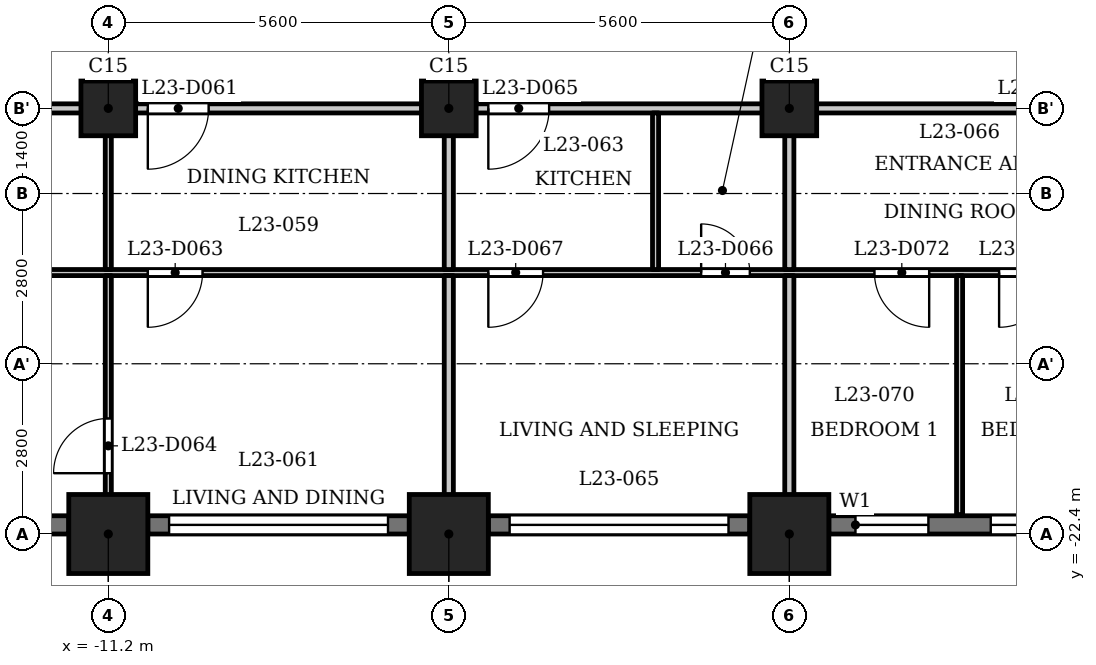
"""IFC4 building model, lengths in metres.
Left out: names, types, materials, properties, quantities, classifications, styles, units other than length and angle.
Written with IfcOpenShell. Run it as: python <this file> out.ifc"""

import sys

from ifc_helpers import new_model, si_unit, direction, frame, frame_2d, origin, origin_2d, place, context, subcontext, project, spatial, rectangle, extrude, element, fill, save


model = new_model("IFC4")
c1 = context("Model", 3, precision=1e-05, world=origin(), true_north=direction((0.0, 1.0)))
c2 = subcontext(c1, "Body", "Model", "MODEL_VIEW")
j1 = project(units=[si_unit("LENGTHUNIT", "METRE"), si_unit("PLANEANGLEUNIT", "RADIAN")], contexts=[c1])
p1 = place(None, origin())
s1 = spatial("IfcSite", under=j1, at=p1, CompositionType="ELEMENT")
p2 = place(p1, origin())
s2 = spatial("IfcBuilding", under=s1, at=p2, CompositionType="ELEMENT")
p3 = place(p2, frame((0.0, 0.0, 93.8)))
s3 = spatial("IfcBuildingStorey", under=s2, at=p3, CompositionType="ELEMENT", Elevation=93.8)
for number, where, z_axis, x_axis in (
    (1, (-11.2, -22.4, 0.0), (0.0, 0.0, 1.0), (1.0, 0.0, 0.0)),
    (2, (-5.6, -22.4, 0.0), (0.0, 0.0, 1.0), (1.0, 0.0, 0.0)),
    (3, (0.0, -22.4, 0.0), (0.0, 0.0, 1.0), (1.0, 0.0, 0.0)),
):
    element("IfcColumn", number, at=place(p3, frame(where, z_axis=z_axis, x_axis=x_axis)), inside=s3, PredefinedType="COLUMN", context=c2, shape_type="SweptSolid", body=[
        extrude(rectangle(XDim=1.3, YDim=1.3, at=origin_2d()), origin(), (0.0, 0.0, 1.0), 3.5),
    ])
for number, where, z_axis, x_axis in (
    (4, (-11.2, -15.4, 0.0), (0.0, 0.0, 1.0), (1.0, 0.0, 0.0)),
    (5, (-5.6, -15.4, 0.0), (0.0, 0.0, 1.0), (1.0, 0.0, 0.0)),
    (6, (0.0, -15.4, 0.0), (0.0, 0.0, 1.0), (1.0, 0.0, 0.0)),
):
    element("IfcColumn", number, at=place(p3, frame(where, z_axis=z_axis, x_axis=x_axis)), inside=s3, PredefinedType="COLUMN", context=c2, shape_type="SweptSolid", body=[
        extrude(rectangle(XDim=0.9, YDim=0.9, at=origin_2d()), origin(), (0.0, 0.0, 1.0), 3.5),
    ])
p4 = place(p3, frame((-16.15, -22.25, 0.0), z_axis=(0.0, 0.0, 1.0), x_axis=(1.0, 0.0, 0.0)))
e7 = element("IfcWall", 7, at=p4, inside=s3, PredefinedType="SOLIDWALL", context=c2, shape_type="SweptSolid", body=[
    extrude(rectangle(XDim=4.3, YDim=0.3, at=frame_2d((2.15, 0.0))), origin(), (0.0, 0.0, 1.0), 2.4),
])
p5 = place(p4, frame((0.35, 0.0, 1.2)))
e8 = element("IfcOpeningElement", 8, at=p5, cuts=e7, PredefinedType="OPENING", context=c2, shape_type="SweptSolid", body=[
    extrude(rectangle(XDim=3.6, YDim=0.95, at=frame_2d((1.8, 0.475))), frame((0.0, 0.16, 0.0), z_axis=(0.0, -1.0, 0.0), x_axis=(1.0, 0.0, 0.0)), (0.0, 0.0, 1.0), 0.32),
])
p6 = place(p3, frame((-10.55, -22.25, 0.0), z_axis=(0.0, 0.0, 1.0), x_axis=(1.0, 0.0, 0.0)))
e9 = element("IfcWall", 9, at=p6, inside=s3, PredefinedType="SOLIDWALL", context=c2, shape_type="SweptSolid", body=[
    extrude(rectangle(XDim=4.3, YDim=0.3, at=frame_2d((2.15, 0.0))), origin(), (0.0, 0.0, 1.0), 2.4),
])
p7 = place(p6, frame((0.35, 0.0, 1.2)))
e10 = element("IfcOpeningElement", 10, at=p7, cuts=e9, PredefinedType="OPENING", context=c2, shape_type="SweptSolid", body=[
    extrude(rectangle(XDim=3.6, YDim=0.95, at=frame_2d((1.8, 0.475))), frame((0.0, 0.16, 0.0), z_axis=(0.0, -1.0, 0.0), x_axis=(1.0, 0.0, 0.0)), (0.0, 0.0, 1.0), 0.32),
])
p8 = place(p3, frame((-4.95, -22.25, 0.0), z_axis=(0.0, 0.0, 1.0), x_axis=(1.0, 0.0, 0.0)))
e11 = element("IfcWall", 11, at=p8, inside=s3, PredefinedType="SOLIDWALL", context=c2, shape_type="SweptSolid", body=[
    extrude(rectangle(XDim=4.3, YDim=0.3, at=frame_2d((2.15, 0.0))), origin(), (0.0, 0.0, 1.0), 2.4),
])
p9 = place(p8, frame((0.35, 0.0, 1.2)))
e12 = element("IfcOpeningElement", 12, at=p9, cuts=e11, PredefinedType="OPENING", context=c2, shape_type="SweptSolid", body=[
    extrude(rectangle(XDim=3.6, YDim=0.95, at=frame_2d((1.8, 0.475))), frame((0.0, 0.16, 0.0), z_axis=(0.0, -1.0, 0.0), x_axis=(1.0, 0.0, 0.0)), (0.0, 0.0, 1.0), 0.32),
])
p10 = place(p3, frame((0.65, -22.25, 0.0), z_axis=(0.0, 0.0, 1.0), x_axis=(1.0, 0.0, 0.0)))
e13 = element("IfcWall", 13, at=p10, inside=s3, PredefinedType="SOLIDWALL", context=c2, shape_type="SweptSolid", body=[
    extrude(rectangle(XDim=4.3, YDim=0.3, at=frame_2d((2.15, 0.0))), origin(), (0.0, 0.0, 1.0), 2.4),
])
p11 = place(p10, frame((0.438, 0.0, 0.6)))
e14 = element("IfcOpeningElement", 14, at=p11, cuts=e13, PredefinedType="OPENING", context=c2, shape_type="SweptSolid", body=[
    extrude(rectangle(XDim=1.2, YDim=1.55, at=frame_2d((0.6, 0.775))), frame((0.0, 0.16, 0.0), z_axis=(0.0, -1.0, 0.0), x_axis=(1.0, 0.0, 0.0)), (0.0, 0.0, 1.0), 0.32),
])
p12 = place(p10, frame((2.663, 0.0, 0.6)))
e15 = element("IfcOpeningElement", 15, at=p12, cuts=e13, PredefinedType="OPENING", context=c2, shape_type="SweptSolid", body=[
    extrude(rectangle(XDim=1.2, YDim=1.55, at=frame_2d((0.6, 0.775))), frame((0.0, 0.16, 0.0), z_axis=(0.0, -1.0, 0.0), x_axis=(1.0, 0.0, 0.0)), (0.0, 0.0, 1.0), 0.32),
])
p13 = place(p3, frame((-26.19, -18.1, 0.0), z_axis=(0.0, 0.0, 1.0), x_axis=(1.0, 0.0, 0.0)))
e16 = element("IfcWall", 16, at=p13, inside=s3, PredefinedType="PARTITIONING", context=c2, shape_type="SweptSolid", body=[
    extrude(rectangle(XDim=52.63, YDim=0.1, at=frame_2d((26.315, 0.0))), origin(), (0.0, 0.0, 1.0), 3.2),
])
p14 = place(p13, frame((1.09, 0.0, 0.0)))
e17 = element("IfcOpeningElement", 17, at=p14, cuts=e16, PredefinedType="OPENING", context=c2, shape_type="SweptSolid", body=[
    extrude(rectangle(XDim=0.8, YDim=2.1, at=frame_2d((0.4, 1.05))), frame((0.0, 0.06, 0.0), z_axis=(0.0, -1.0, 0.0), x_axis=(1.0, 0.0, 0.0)), (0.0, 0.0, 1.0), 0.12),
])
p15 = place(p13, frame((4.44, 0.0, 0.0)))
e18 = element("IfcOpeningElement", 18, at=p15, cuts=e16, PredefinedType="OPENING", context=c2, shape_type="SweptSolid", body=[
    extrude(rectangle(XDim=0.9, YDim=2.1, at=frame_2d((0.45, 1.05))), frame((0.0, 0.06, 0.0), z_axis=(0.0, -1.0, 0.0), x_axis=(1.0, 0.0, 0.0)), (0.0, 0.0, 1.0), 0.12),
])
p16 = place(p13, frame((10.04, 0.0, 0.0)))
e19 = element("IfcOpeningElement", 19, at=p16, cuts=e16, PredefinedType="OPENING", context=c2, shape_type="SweptSolid", body=[
    extrude(rectangle(XDim=0.8, YDim=2.1, at=frame_2d((0.4, 1.05))), frame((0.0, 0.06, 0.0), z_axis=(0.0, -1.0, 0.0), x_axis=(1.0, 0.0, 0.0)), (0.0, 0.0, 1.0), 0.12),
])
p17 = place(p13, frame((15.64, 0.0, 0.0)))
e20 = element("IfcOpeningElement", 20, at=p17, cuts=e16, PredefinedType="OPENING", context=c2, shape_type="SweptSolid", body=[
    extrude(rectangle(XDim=0.9, YDim=2.1, at=frame_2d((0.45, 1.05))), frame((0.0, 0.06, 0.0), z_axis=(0.0, -1.0, 0.0), x_axis=(1.0, 0.0, 0.0)), (0.0, 0.0, 1.0), 0.12),
])
p18 = place(p13, frame((24.74, 0.0, 0.0)))
e21 = element("IfcOpeningElement", 21, at=p18, cuts=e16, PredefinedType="OPENING", context=c2, shape_type="SweptSolid", body=[
    extrude(rectangle(XDim=0.8, YDim=2.1, at=frame_2d((0.4, 1.05))), frame((0.0, 0.06, 0.0), z_axis=(0.0, -1.0, 0.0), x_axis=(1.0, 0.0, 0.0)), (0.0, 0.0, 1.0), 0.12),
])
p19 = place(p13, frame((21.24, 0.0, 0.0)))
e22 = element("IfcOpeningElement", 22, at=p19, cuts=e16, PredefinedType="OPENING", context=c2, shape_type="SweptSolid", body=[
    extrude(rectangle(XDim=0.9, YDim=2.1, at=frame_2d((0.45, 1.05))), frame((0.0, 0.06, 0.0), z_axis=(0.0, -1.0, 0.0), x_axis=(1.0, 0.0, 0.0)), (0.0, 0.0, 1.0), 0.12),
])
p20 = place(p13, frame((35.94, 0.0, 0.0)))
e23 = element("IfcOpeningElement", 23, at=p20, cuts=e16, PredefinedType="OPENING", context=c2, shape_type="SweptSolid", body=[
    extrude(rectangle(XDim=0.8, YDim=2.1, at=frame_2d((0.4, 1.05))), frame((0.0, 0.06, 0.0), z_axis=(0.0, -1.0, 0.0), x_axis=(1.0, 0.0, 0.0)), (0.0, 0.0, 1.0), 0.12),
])
p21 = place(p13, frame((33.19, 0.0, 0.0)))
e24 = element("IfcOpeningElement", 24, at=p21, cuts=e16, PredefinedType="OPENING", context=c2, shape_type="SweptSolid", body=[
    extrude(rectangle(XDim=0.9, YDim=2.1, at=frame_2d((0.45, 1.05))), frame((0.0, 0.06, 0.0), z_axis=(0.0, -1.0, 0.0), x_axis=(1.0, 0.0, 0.0)), (0.0, 0.0, 1.0), 0.12),
])
p22 = place(p13, frame((27.59, 0.0, 0.0)))
e25 = element("IfcOpeningElement", 25, at=p22, cuts=e16, PredefinedType="OPENING", context=c2, shape_type="SweptSolid", body=[
    extrude(rectangle(XDim=0.9, YDim=2.1, at=frame_2d((0.45, 1.05))), frame((0.0, 0.06, 0.0), z_axis=(0.0, -1.0, 0.0), x_axis=(1.0, 0.0, 0.0)), (0.0, 0.0, 1.0), 0.12),
])
p23 = place(p13, frame((29.64, 0.0, 0.0)))
e26 = element("IfcOpeningElement", 26, at=p23, cuts=e16, PredefinedType="OPENING", context=c2, shape_type="SweptSolid", body=[
    extrude(rectangle(XDim=0.9, YDim=2.1, at=frame_2d((0.45, 1.05))), frame((0.0, 0.06, 0.0), z_axis=(0.0, -1.0, 0.0), x_axis=(1.0, 0.0, 0.0)), (0.0, 0.0, 1.0), 0.12),
])
p24 = place(p13, frame((41.54, 0.0, 0.0)))
e27 = element("IfcOpeningElement", 27, at=p24, cuts=e16, PredefinedType="OPENING", context=c2, shape_type="SweptSolid", body=[
    extrude(rectangle(XDim=0.8, YDim=2.1, at=frame_2d((0.4, 1.05))), frame((0.0, 0.06, 0.0), z_axis=(0.0, -1.0, 0.0), x_axis=(1.0, 0.0, 0.0)), (0.0, 0.0, 1.0), 0.12),
])
p25 = place(p13, frame((38.54, 0.0, 0.0)))
e28 = element("IfcOpeningElement", 28, at=p25, cuts=e16, PredefinedType="OPENING", context=c2, shape_type="SweptSolid", body=[
    extrude(rectangle(XDim=0.9, YDim=2.1, at=frame_2d((0.45, 1.05))), frame((0.0, 0.06, 0.0), z_axis=(0.0, -1.0, 0.0), x_axis=(1.0, 0.0, 0.0)), (0.0, 0.0, 1.0), 0.12),
])
p26 = place(p13, frame((49.204, 0.0, 0.0)))
e29 = element("IfcOpeningElement", 29, at=p26, cuts=e16, PredefinedType="OPENING", context=c2, shape_type="SweptSolid", body=[
    extrude(rectangle(XDim=0.8, YDim=2.1, at=frame_2d((0.4, 1.05))), frame((0.0, 0.06, 0.0), z_axis=(0.0, -1.0, 0.0), x_axis=(1.0, 0.0, 0.0)), (0.0, 0.0, 1.0), 0.12),
])
p27 = place(p13, frame((43.64, 0.0, 0.0)))
e30 = element("IfcOpeningElement", 30, at=p27, cuts=e16, PredefinedType="OPENING", context=c2, shape_type="SweptSolid", body=[
    extrude(rectangle(XDim=0.9, YDim=2.1, at=frame_2d((0.45, 1.05))), frame((0.0, 0.06, 0.0), z_axis=(0.0, -1.0, 0.0), x_axis=(1.0, 0.0, 0.0)), (0.0, 0.0, 1.0), 0.12),
])
p28 = place(p3, frame((-27.484, -15.4, 0.0), z_axis=(0.0, 0.0, 1.0), x_axis=(1.0, 0.0, 0.0)))
e31 = element("IfcWall", 31, at=p28, inside=s3, PredefinedType="PARTITIONING", context=c2, shape_type="SweptSolid", body=[
    extrude(rectangle(XDim=54.968, YDim=0.15, at=frame_2d((27.484, 0.0))), origin(), (0.0, 0.0, 1.0), 3.2),
])
p29 = place(p28, frame((5.734, 0.0, 0.0)))
e32 = element("IfcOpeningElement", 32, at=p29, cuts=e31, PredefinedType="OPENING", context=c2, shape_type="SweptSolid", body=[
    extrude(rectangle(XDim=1.0, YDim=2.1, at=frame_2d((0.5, 1.05))), frame((0.0, 0.085, 0.0), z_axis=(0.0, -1.0, 0.0), x_axis=(1.0, 0.0, 0.0)), (0.0, 0.0, 1.0), 0.17),
])
p30 = place(p28, frame((16.934, 0.0, 0.0)))
e33 = element("IfcOpeningElement", 33, at=p30, cuts=e31, PredefinedType="OPENING", context=c2, shape_type="SweptSolid", body=[
    extrude(rectangle(XDim=1.0, YDim=2.1, at=frame_2d((0.5, 1.05))), frame((0.0, 0.085, 0.0), z_axis=(0.0, -1.0, 0.0), x_axis=(1.0, 0.0, 0.0)), (0.0, 0.0, 1.0), 0.17),
])
p31 = place(p28, frame((22.534, 0.0, 0.0)))
e34 = element("IfcOpeningElement", 34, at=p31, cuts=e31, PredefinedType="OPENING", context=c2, shape_type="SweptSolid", body=[
    extrude(rectangle(XDim=1.0, YDim=2.1, at=frame_2d((0.5, 1.05))), frame((0.0, 0.085, 0.0), z_axis=(0.0, -1.0, 0.0), x_axis=(1.0, 0.0, 0.0)), (0.0, 0.0, 1.0), 0.17),
])
p32 = place(p28, frame((31.384, 0.0, 0.0)))
e35 = element("IfcOpeningElement", 35, at=p32, cuts=e31, PredefinedType="OPENING", context=c2, shape_type="SweptSolid", body=[
    extrude(rectangle(XDim=1.0, YDim=2.1, at=frame_2d((0.5, 1.05))), frame((0.0, 0.085, 0.0), z_axis=(0.0, -1.0, 0.0), x_axis=(1.0, 0.0, 0.0)), (0.0, 0.0, 1.0), 0.17),
])
p33 = place(p28, frame((39.584, 0.0, 0.0)))
e36 = element("IfcOpeningElement", 36, at=p33, cuts=e31, PredefinedType="OPENING", context=c2, shape_type="SweptSolid", body=[
    extrude(rectangle(XDim=1.0, YDim=2.1, at=frame_2d((0.5, 1.05))), frame((0.0, 0.085, 0.0), z_axis=(0.0, -1.0, 0.0), x_axis=(1.0, 0.0, 0.0)), (0.0, 0.0, 1.0), 0.17),
])
p34 = place(p28, frame((44.934, 0.0, 0.0)))
e37 = element("IfcOpeningElement", 37, at=p34, cuts=e31, PredefinedType="OPENING", context=c2, shape_type="SweptSolid", body=[
    extrude(rectangle(XDim=1.0, YDim=2.1, at=frame_2d((0.5, 1.05))), frame((0.0, 0.085, 0.0), z_axis=(0.0, -1.0, 0.0), x_axis=(1.0, 0.0, 0.0)), (0.0, 0.0, 1.0), 0.17),
])
p35 = place(p3, frame((-11.2, -23.03, 0.0), z_axis=(0.0, 0.0, 1.0), x_axis=(0.0, 1.0, 0.0)))
e38 = element("IfcWall", 38, at=p35, inside=s3, PredefinedType="PARTITIONING", context=c2, shape_type="SweptSolid", body=[
    extrude(rectangle(XDim=4.88, YDim=0.1, at=frame_2d((2.44, 0.0))), origin(), (0.0, 0.0, 1.0), 3.2),
])
p36 = place(p35, frame((1.63, 0.0, 0.0)))
e39 = element("IfcOpeningElement", 39, at=p36, cuts=e38, PredefinedType="OPENING", context=c2, shape_type="SweptSolid", body=[
    extrude(rectangle(XDim=0.9, YDim=2.1, at=frame_2d((0.45, 1.05))), frame((0.0, 0.06, 0.0), z_axis=(0.0, -1.0, 0.0), x_axis=(1.0, 0.0, 0.0)), (0.0, 0.0, 1.0), 0.12),
])
p37 = place(p3, frame((-11.2, -18.05, 0.0), z_axis=(0.0, 0.0, 1.0), x_axis=(0.0, 1.0, 0.0)))
e40 = element("IfcWall", 40, at=p37, inside=s3, PredefinedType="PARTITIONING", context=c2, shape_type="SweptSolid", body=[
    extrude(rectangle(XDim=2.575, YDim=0.1, at=frame_2d((1.288, 0.0))), origin(), (0.0, 0.0, 1.0), 3.2),
])
p38 = place(p3, frame((-5.6, -23.03, 0.0), z_axis=(0.0, 0.0, 1.0), x_axis=(0.0, 1.0, 0.0)))
e41 = element("IfcWall", 41, at=p38, inside=s3, PredefinedType="PARTITIONING", context=c2, shape_type="SweptSolid", body=[
    extrude(rectangle(XDim=4.88, YDim=0.15, at=frame_2d((2.44, 0.0))), origin(), (0.0, 0.0, 1.0), 3.2),
])
p39 = place(p3, frame((-5.6, -18.05, 0.0), z_axis=(0.0, 0.0, 1.0), x_axis=(0.0, 1.0, 0.0)))
e42 = element("IfcWall", 42, at=p39, inside=s3, PredefinedType="PARTITIONING", context=c2, shape_type="SweptSolid", body=[
    extrude(rectangle(XDim=2.575, YDim=0.15, at=frame_2d((1.288, 0.0))), origin(), (0.0, 0.0, 1.0), 3.2),
])
p40 = place(p3, frame((-2.2, -18.05, 0.0), z_axis=(0.0, 0.0, 1.0), x_axis=(0.0, 1.0, 0.0)))
e43 = element("IfcWall", 43, at=p40, inside=s3, PredefinedType="PARTITIONING", context=c2, shape_type="SweptSolid", body=[
    extrude(rectangle(XDim=2.575, YDim=0.1, at=frame_2d((1.288, 0.0))), origin(), (0.0, 0.0, 1.0), 3.2),
])
p41 = place(p3, frame((0.0, -23.03, 0.0), z_axis=(0.0, 0.0, 1.0), x_axis=(0.0, 1.0, 0.0)))
e44 = element("IfcWall", 44, at=p41, inside=s3, PredefinedType="PARTITIONING", context=c2, shape_type="SweptSolid", body=[
    extrude(rectangle(XDim=4.88, YDim=0.15, at=frame_2d((2.44, 0.0))), origin(), (0.0, 0.0, 1.0), 3.2),
])
p42 = place(p3, frame((0.0, -18.05, 0.0), z_axis=(0.0, 0.0, 1.0), x_axis=(0.0, 1.0, 0.0)))
e45 = element("IfcWall", 45, at=p42, inside=s3, PredefinedType="PARTITIONING", context=c2, shape_type="SweptSolid", body=[
    extrude(rectangle(XDim=2.575, YDim=0.15, at=frame_2d((1.288, 0.0))), origin(), (0.0, 0.0, 1.0), 3.2),
])
p43 = place(p3, frame((2.8, -22.08, 0.0), z_axis=(0.0, 0.0, 1.0), x_axis=(0.0, 1.0, 0.0)))
e46 = element("IfcWall", 46, at=p43, inside=s3, PredefinedType="PARTITIONING", context=c2, shape_type="SweptSolid", body=[
    extrude(rectangle(XDim=3.93, YDim=0.1, at=frame_2d((1.965, 0.0))), origin(), (0.0, 0.0, 1.0), 3.2),
])
p44 = place(p30, origin())
e47 = element("IfcDoor", 47, at=p44, inside=s3, OperationType="SINGLE_SWING_LEFT", PredefinedType="DOOR", context=c2, shape_type="SweptSolid", body=[
    extrude(rectangle(XDim=1.0, YDim=2.1, at=frame_2d((0.5, 1.05))), frame((0.0, 0.025, 0.0), z_axis=(0.0, -1.0, 0.0), x_axis=(1.0, 0.0, 0.0)), (0.0, 0.0, 1.0), 0.05),
])
fill(e33, e47)
p45 = place(p17, origin())
e48 = element("IfcDoor", 48, at=p45, inside=s3, OperationType="SINGLE_SWING_LEFT", PredefinedType="DOOR", context=c2, shape_type="SweptSolid", body=[
    extrude(rectangle(XDim=0.9, YDim=2.1, at=frame_2d((0.45, 1.05))), frame((0.0, 0.025, 0.0), z_axis=(0.0, -1.0, 0.0), x_axis=(1.0, 0.0, 0.0)), (0.0, 0.0, 1.0), 0.05),
])
fill(e20, e48)
p46 = place(p36, origin())
e49 = element("IfcDoor", 49, at=p46, inside=s3, OperationType="SINGLE_SWING_RIGHT", PredefinedType="DOOR", context=c2, shape_type="SweptSolid", body=[
    extrude(rectangle(XDim=0.9, YDim=2.1, at=frame_2d((0.45, 1.05))), frame((0.0, 0.025, 0.0), z_axis=(0.0, -1.0, 0.0), x_axis=(1.0, 0.0, 0.0)), (0.0, 0.0, 1.0), 0.05),
])
fill(e39, e49)
p47 = place(p31, origin())
e50 = element("IfcDoor", 50, at=p47, inside=s3, OperationType="SINGLE_SWING_LEFT", PredefinedType="DOOR", context=c2, shape_type="SweptSolid", body=[
    extrude(rectangle(XDim=1.0, YDim=2.1, at=frame_2d((0.5, 1.05))), frame((0.0, 0.025, 0.0), z_axis=(0.0, -1.0, 0.0), x_axis=(1.0, 0.0, 0.0)), (0.0, 0.0, 1.0), 0.05),
])
fill(e34, e50)
p48 = place(p18, origin())
e51 = element("IfcDoor", 51, at=p48, inside=s3, OperationType="SINGLE_SWING_RIGHT", PredefinedType="DOOR", context=c2, shape_type="SweptSolid", body=[
    extrude(rectangle(XDim=0.8, YDim=2.1, at=frame_2d((0.4, 1.05))), frame((0.0, 0.025, 0.0), z_axis=(0.0, -1.0, 0.0), x_axis=(1.0, 0.0, 0.0)), (0.0, 0.0, 1.0), 0.05),
])
fill(e21, e51)
p49 = place(p19, origin())
e52 = element("IfcDoor", 52, at=p49, inside=s3, OperationType="SINGLE_SWING_LEFT", PredefinedType="DOOR", context=c2, shape_type="SweptSolid", body=[
    extrude(rectangle(XDim=0.9, YDim=2.1, at=frame_2d((0.45, 1.05))), frame((0.0, 0.025, 0.0), z_axis=(0.0, -1.0, 0.0), x_axis=(1.0, 0.0, 0.0)), (0.0, 0.0, 1.0), 0.05),
])
fill(e22, e52)
p50 = place(p22, origin())
e53 = element("IfcDoor", 53, at=p50, inside=s3, OperationType="SINGLE_SWING_RIGHT", PredefinedType="DOOR", context=c2, shape_type="SweptSolid", body=[
    extrude(rectangle(XDim=0.9, YDim=2.1, at=frame_2d((0.45, 1.05))), frame((0.0, 0.025, 0.0), z_axis=(0.0, -1.0, 0.0), x_axis=(1.0, 0.0, 0.0)), (0.0, 0.0, 1.0), 0.05),
])
fill(e25, e53)
p51 = place(p23, origin())
e54 = element("IfcDoor", 54, at=p51, inside=s3, OperationType="SINGLE_SWING_LEFT", PredefinedType="DOOR", context=c2, shape_type="SweptSolid", body=[
    extrude(rectangle(XDim=0.9, YDim=2.1, at=frame_2d((0.45, 1.05))), frame((0.0, 0.025, 0.0), z_axis=(0.0, -1.0, 0.0), x_axis=(1.0, 0.0, 0.0)), (0.0, 0.0, 1.0), 0.05),
])
fill(e26, e54)
p52 = place(p7, origin())
e55 = element("IfcWindow", 55, at=p52, inside=s3, PartitioningType="SINGLE_PANEL", PredefinedType="WINDOW", context=c2, shape_type="SweptSolid", body=[
    extrude(rectangle(XDim=3.6, YDim=0.95, at=frame_2d((1.8, 0.475))), frame((0.0, 0.03, 0.0), z_axis=(0.0, -1.0, 0.0), x_axis=(1.0, 0.0, 0.0)), (0.0, 0.0, 1.0), 0.06),
])
fill(e10, e55)
p53 = place(p9, origin())
e56 = element("IfcWindow", 56, at=p53, inside=s3, PartitioningType="SINGLE_PANEL", PredefinedType="WINDOW", context=c2, shape_type="SweptSolid", body=[
    extrude(rectangle(XDim=3.6, YDim=0.95, at=frame_2d((1.8, 0.475))), frame((0.0, 0.03, 0.0), z_axis=(0.0, -1.0, 0.0), x_axis=(1.0, 0.0, 0.0)), (0.0, 0.0, 1.0), 0.06),
])
fill(e12, e56)
p54 = place(p11, origin())
e57 = element("IfcWindow", 57, at=p54, inside=s3, PartitioningType="SINGLE_PANEL", PredefinedType="WINDOW", context=c2, shape_type="SweptSolid", body=[
    extrude(rectangle(XDim=1.2, YDim=1.55, at=frame_2d((0.6, 0.775))), frame((0.0, 0.03, 0.0), z_axis=(0.0, -1.0, 0.0), x_axis=(1.0, 0.0, 0.0)), (0.0, 0.0, 1.0), 0.06),
])
fill(e14, e57)
p55 = place(p12, origin())
e58 = element("IfcWindow", 58, at=p55, inside=s3, PartitioningType="SINGLE_PANEL", PredefinedType="WINDOW", context=c2, shape_type="SweptSolid", body=[
    extrude(rectangle(XDim=1.2, YDim=1.55, at=frame_2d((0.6, 0.775))), frame((0.0, 0.03, 0.0), z_axis=(0.0, -1.0, 0.0), x_axis=(1.0, 0.0, 0.0)), (0.0, 0.0, 1.0), 0.06),
])
fill(e15, e58)
save(model, sys.argv[1])
